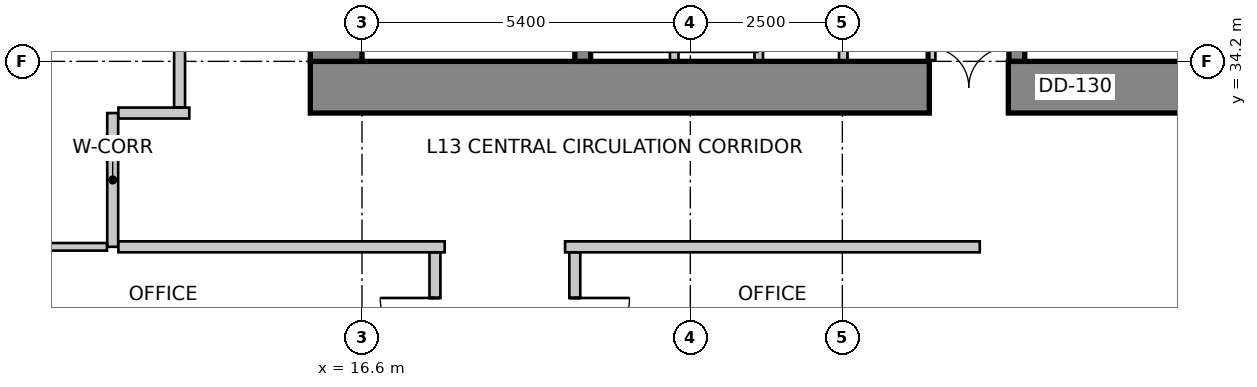
"""IFC4 building model, lengths in metres.
Left out: names, types, materials, properties, quantities, classifications, styles, units other than length and angle.
Written with IfcOpenShell. Run it as: python <this file> out.ifc"""

import sys

from ifc_helpers import new_model, si_unit, direction, frame, frame_2d, origin, place, context, subcontext, project, spatial, rectangle, extrude, source, transform, mapped, element, fill, save


model = new_model("IFC4")
c1 = context("Model", 3, precision=1e-05, world=origin(), true_north=direction((0.0, 1.0)))
c2 = subcontext(c1, "Body", "Model", "MODEL_VIEW")
j1 = project(units=[si_unit("LENGTHUNIT", "METRE"), si_unit("PLANEANGLEUNIT", "RADIAN")], contexts=[c1])
p1 = place(None, origin())
s1 = spatial("IfcSite", under=j1, at=p1, CompositionType="ELEMENT")
p2 = place(p1, origin())
s2 = spatial("IfcBuilding", under=s1, at=p2, CompositionType="ELEMENT")
p3 = place(p2, frame((0.0, 0.0, 55.0)))
s3 = spatial("IfcBuildingStorey", under=s2, at=p3, CompositionType="ELEMENT", Elevation=55.0)
p4 = place(p3, frame((15.75, 33.775, 0.0), z_axis=(0.0, 0.0, 1.0), x_axis=(1.0, 0.0, 0.0)))
e1 = element("IfcWall", 1, at=p4, inside=s3, PredefinedType="SHEAR", context=c2, shape_type="SweptSolid", body=[
    extrude(rectangle(XDim=16.1, YDim=0.85, at=frame_2d((8.05, 0.0))), origin(), (0.0, 0.0, 1.0), 4.0),
])
m1 = source(origin(), c2, "Body", "SweptSolid", [
    extrude(rectangle(XDim=1.3, YDim=2.15, at=frame_2d((0.65, 1.075))), frame((0.0, 0.435, 0.0), z_axis=(0.0, -1.0, 0.0), x_axis=(1.0, 0.0, 0.0)), (0.0, 0.0, 1.0), 0.87),
])
p5 = place(p4, frame((10.18, 0.0, 0.0)))
e2 = element("IfcOpeningElement", 2, at=p5, cuts=e1, PredefinedType="OPENING", context=c2, shape_type="MappedRepresentation", body=[
    mapped(m1, transform((0.0, 0.0, 0.0), scale=1.0)),
])
p6 = place(p3, frame((16.175, 34.2, 0.0), z_axis=(0.0, 0.0, 1.0), x_axis=(0.0, 1.0, 0.0)))
e3 = element("IfcWall", 3, at=p6, inside=s3, PredefinedType="SHEAR", context=c2, shape_type="SweptSolid", body=[
    extrude(rectangle(XDim=11.4, YDim=0.85, at=frame_2d((5.7, 0.0))), origin(), (0.0, 0.0, 1.0), 4.0),
])
m2 = source(origin(), c2, "Body", "SweptSolid", [
    extrude(rectangle(XDim=1.1, YDim=2.15, at=frame_2d((0.55, 1.075))), frame((0.0, 0.435, 0.0), z_axis=(0.0, -1.0, 0.0), x_axis=(1.0, 0.0, 0.0)), (0.0, 0.0, 1.0), 0.87),
])
p7 = place(p6, frame((7.15, 0.0, 0.0)))
e4 = element("IfcOpeningElement", 4, at=p7, cuts=e3, PredefinedType="OPENING", context=c2, shape_type="MappedRepresentation", body=[
    mapped(m2, transform((0.0, 0.0, 0.0), scale=1.0)),
])
p8 = place(p3, frame((20.23, 34.2, 0.0), z_axis=(0.0, 0.0, 1.0), x_axis=(0.0, 1.0, 0.0)))
e5 = element("IfcWall", 5, at=p8, inside=s3, PredefinedType="SHEAR", context=c2, shape_type="SweptSolid", body=[
    extrude(rectangle(XDim=9.06, YDim=0.26, at=frame_2d((4.53, 0.0))), origin(), (0.0, 0.0, 1.0), 4.0),
])
m3 = source(origin(), c2, "Body", "SweptSolid", [
    extrude(rectangle(XDim=1.1, YDim=2.15, at=frame_2d((0.55, 1.075))), frame((0.0, 0.14, 0.0), z_axis=(0.0, -1.0, 0.0), x_axis=(1.0, 0.0, 0.0)), (0.0, 0.0, 1.0), 0.28),
])
p9 = place(p8, frame((7.45, 0.0, 0.0)))
e6 = element("IfcOpeningElement", 6, at=p9, cuts=e5, PredefinedType="OPENING", context=c2, shape_type="MappedRepresentation", body=[
    mapped(m3, transform((0.0, 0.0, 0.0), scale=1.0)),
])
p10 = place(p3, frame((27.37, 34.2, 0.0), z_axis=(0.0, 0.0, 1.0), x_axis=(0.0, 1.0, 0.0)))
e7 = element("IfcWall", 7, at=p10, inside=s3, PredefinedType="SHEAR", context=c2, shape_type="SweptSolid", body=[
    extrude(rectangle(XDim=9.06, YDim=0.26, at=frame_2d((4.53, 0.0))), origin(), (0.0, 0.0, 1.0), 4.0),
])
p11 = place(p10, frame((7.45, 0.0, 0.0)))
e8 = element("IfcOpeningElement", 8, at=p11, cuts=e7, PredefinedType="OPENING", context=c2, shape_type="MappedRepresentation", body=[
    mapped(m3, transform((0.0, 0.0, 0.0), scale=1.0)),
])
p12 = place(p3, frame((13.269, 47.134, 0.0), z_axis=(0.0, 0.0, 1.0), x_axis=(-0.319920423265, -0.947444416722, 0.0)))
e9 = element("IfcWall", 9, at=p12, inside=s3, PredefinedType="SOLIDWALL", context=c2, shape_type="SweptSolid", body=[
    extrude(rectangle(XDim=16.135, YDim=0.3, at=frame_2d((8.067, 0.0))), origin(), (0.0, 0.0, 1.0), 3.75),
])
m4 = source(origin(), c2, "Body", "SweptSolid", [
    extrude(rectangle(XDim=2.4, YDim=2.2, at=frame_2d((1.2, 1.1))), frame((0.0, 0.16, 0.0), z_axis=(0.0, -1.0, 0.0), x_axis=(1.0, 0.0, 0.0)), (0.0, 0.0, 1.0), 0.32),
])
p13 = place(p12, frame((2.188, 0.0, 0.85)))
e10 = element("IfcOpeningElement", 10, at=p13, cuts=e9, PredefinedType="OPENING", context=c2, shape_type="MappedRepresentation", body=[
    mapped(m4, transform((0.0, 0.0, 0.0), scale=1.0)),
])
m5 = source(origin(), c2, "Body", "SweptSolid", [
    extrude(rectangle(XDim=2.8, YDim=2.4, at=frame_2d((1.4, 1.2))), frame((0.0, 0.16, 0.0), z_axis=(0.0, -1.0, 0.0), x_axis=(1.0, 0.0, 0.0)), (0.0, 0.0, 1.0), 0.32),
])
p14 = place(p12, frame((6.959, 0.0, 0.85)))
e11 = element("IfcOpeningElement", 11, at=p14, cuts=e9, PredefinedType="OPENING", context=c2, shape_type="MappedRepresentation", body=[
    mapped(m5, transform((0.0, 0.0, 0.0), scale=1.0)),
])
p15 = place(p12, frame((12.13, 0.0, 0.85)))
e12 = element("IfcOpeningElement", 12, at=p15, cuts=e9, PredefinedType="OPENING", context=c2, shape_type="MappedRepresentation", body=[
    mapped(m4, transform((0.0, 0.0, 0.0), scale=1.0)),
])
p16 = place(p3, frame((8.183, 31.833, 0.0), z_axis=(0.0, 0.0, 1.0), x_axis=(0.18216364648, -0.983268226834, 0.0)))
e13 = element("IfcWall", 13, at=p16, inside=s3, PredefinedType="SOLIDWALL", context=c2, shape_type="SweptSolid", body=[
    extrude(rectangle(XDim=26.678, YDim=0.3, at=frame_2d((13.339, 0.0))), origin(), (0.0, 0.0, 1.0), 3.75),
])
m6 = source(origin(), c2, "Body", "SweptSolid", [
    extrude(rectangle(XDim=2.1, YDim=2.0, at=frame_2d((1.05, 1.0))), frame((0.0, 0.16, 0.0), z_axis=(0.0, -1.0, 0.0), x_axis=(1.0, 0.0, 0.0)), (0.0, 0.0, 1.0), 0.32),
])
p17 = place(p16, frame((1.014, 0.0, 0.85)))
e14 = element("IfcOpeningElement", 14, at=p17, cuts=e13, PredefinedType="OPENING", context=c2, shape_type="MappedRepresentation", body=[
    mapped(m6, transform((0.0, 0.0, 0.0), scale=1.0)),
])
p18 = place(p16, frame((4.3, 0.0, 0.85)))
e15 = element("IfcOpeningElement", 15, at=p18, cuts=e13, PredefinedType="OPENING", context=c2, shape_type="MappedRepresentation", body=[
    mapped(m5, transform((0.0, 0.0, 0.0), scale=1.0)),
])
p19 = place(p16, frame((8.876, 0.0, 0.85)))
e16 = element("IfcOpeningElement", 16, at=p19, cuts=e13, PredefinedType="OPENING", context=c2, shape_type="MappedRepresentation", body=[
    mapped(m5, transform((0.0, 0.0, 0.0), scale=1.0)),
])
p20 = place(p16, frame((13.453, 0.0, 0.85)))
e17 = element("IfcOpeningElement", 17, at=p20, cuts=e13, PredefinedType="OPENING", context=c2, shape_type="MappedRepresentation", body=[
    mapped(m5, transform((0.0, 0.0, 0.0), scale=1.0)),
])
p21 = place(p16, frame((18.211, 0.0, 0.85)))
e18 = element("IfcOpeningElement", 18, at=p21, cuts=e13, PredefinedType="OPENING", context=c2, shape_type="MappedRepresentation", body=[
    mapped(m5, transform((0.0, 0.0, 0.0), scale=1.0)),
])
p22 = place(p16, frame((22.909, 0.0, 0.85)))
e19 = element("IfcOpeningElement", 19, at=p22, cuts=e13, PredefinedType="OPENING", context=c2, shape_type="MappedRepresentation", body=[
    mapped(m4, transform((0.0, 0.0, 0.0), scale=1.0)),
])
for number, where, z_axis, x_axis in (
    (20, (25.96, 34.22, 0.0), (0.0, 0.0, 1.0), (0.0, 1.0, 0.0)),
    (21, (21.735, 34.22, 0.0), (0.0, 0.0, 1.0), (0.0, 1.0, 0.0)),
    (22, (23.125, 34.22, 0.0), (0.0, 0.0, 1.0), (0.0, 1.0, 0.0)),
    (23, (24.515, 34.22, 0.0), (0.0, 0.0, 1.0), (0.0, 1.0, 0.0)),
):
    element("IfcWall", number, at=place(p3, frame(where, z_axis=z_axis, x_axis=x_axis)), inside=s3, PredefinedType="SOLIDWALL", context=c2, shape_type="SweptSolid", body=[
        extrude(rectangle(XDim=1.62, YDim=0.14, at=frame_2d((0.81, 0.0))), origin(), (0.0, 0.0, 1.0), 3.042),
    ])
p23 = place(p3, frame((12.5, 31.15, 0.0), z_axis=(0.0, 0.0, 1.0), x_axis=(0.0, 1.0, 0.0)))
e24 = element("IfcWall", 24, at=p23, inside=s3, PredefinedType="PARTITIONING", context=c2, shape_type="SweptSolid", body=[
    extrude(rectangle(XDim=2.2, YDim=0.18, at=frame_2d((1.1, 0.0))), origin(), (0.0, 0.0, 1.0), 3.419),
])
p24 = place(p3, frame((12.594, 33.35, 0.0), z_axis=(0.0, 0.0, 1.0), x_axis=(1.0, 0.0, 0.0)))
e25 = element("IfcWall", 25, at=p24, inside=s3, PredefinedType="PARTITIONING", context=c2, shape_type="SweptSolid", body=[
    extrude(rectangle(XDim=1.166, YDim=0.18, at=frame_2d((0.583, 0.0))), origin(), (0.0, 0.0, 1.0), 3.75),
])
p25 = place(p3, frame((17.96, 31.15, 0.0), z_axis=(0.0, 0.0, 1.0), x_axis=(-1.0, 0.0, 0.0)))
e26 = element("IfcWall", 26, at=p25, inside=s3, PredefinedType="PARTITIONING", context=c2, shape_type="SweptSolid", body=[
    extrude(rectangle(XDim=5.366, YDim=0.18, at=frame_2d((2.683, 0.0))), origin(), (0.0, 0.0, 1.0), 3.419),
])
p26 = place(p3, frame((26.76, 31.15, 0.0), z_axis=(0.0, 0.0, 1.0), x_axis=(-1.0, 0.0, 0.0)))
e27 = element("IfcWall", 27, at=p26, inside=s3, PredefinedType="PARTITIONING", context=c2, shape_type="SweptSolid", body=[
    extrude(rectangle(XDim=6.82, YDim=0.18, at=frame_2d((3.41, 0.0))), origin(), (0.0, 0.0, 1.0), 3.419),
])
p27 = place(p3, frame((13.6, 33.444, 0.0), z_axis=(0.0, 0.0, 1.0), x_axis=(0.0, 1.0, 0.0)))
e28 = element("IfcWall", 28, at=p27, inside=s3, PredefinedType="PARTITIONING", context=c2, shape_type="SweptSolid", body=[
    extrude(rectangle(XDim=13.896, YDim=0.18, at=frame_2d((6.948, 0.0))), origin(), (0.0, 0.0, 1.0), 2.892),
])
m7 = source(origin(), c2, "Body", "SweptSolid", [
    extrude(rectangle(XDim=0.9, YDim=2.15, at=frame_2d((0.45, 1.075))), frame((0.0, 0.1, 0.0), z_axis=(0.0, -1.0, 0.0), x_axis=(1.0, 0.0, 0.0)), (0.0, 0.0, 1.0), 0.2),
])
p28 = place(p27, frame((4.144, 0.0, 0.0)))
e29 = element("IfcOpeningElement", 29, at=p28, cuts=e28, PredefinedType="OPENING", context=c2, shape_type="MappedRepresentation", body=[
    mapped(m7, transform((0.0, 0.0, 0.0), scale=1.0)),
])
p29 = place(p3, frame((12.406, 31.15, 0.0), z_axis=(0.0, 0.0, 1.0), x_axis=(-1.0, 0.0, 0.0)))
e30 = element("IfcWall", 30, at=p29, inside=s3, PredefinedType="PARTITIONING", context=c2, shape_type="SweptSolid", body=[
    extrude(rectangle(XDim=3.979, YDim=0.125, at=frame_2d((1.99, 0.0))), origin(), (0.0, 0.0, 1.0), 2.892),
])
p30 = place(p3, frame((17.8, 28.662, 0.0), z_axis=(0.0, 0.0, 1.0), x_axis=(0.0, 1.0, 0.0)))
e31 = element("IfcWall", 31, at=p30, inside=s3, PredefinedType="PARTITIONING", context=c2, shape_type="SweptSolid", body=[
    extrude(rectangle(XDim=2.394, YDim=0.18, at=frame_2d((1.197, 0.0))), origin(), (0.0, 0.0, 1.0), 3.419),
])
p31 = place(p30, frame((0.747, 0.0, 0.0)))
e32 = element("IfcOpeningElement", 32, at=p31, cuts=e31, PredefinedType="OPENING", context=c2, shape_type="MappedRepresentation", body=[
    mapped(m7, transform((0.0, 0.0, 0.0), scale=1.0)),
])
p32 = place(p3, frame((20.1, 31.056, 0.0), z_axis=(0.0, 0.0, 1.0), x_axis=(0.0, -1.0, 0.0)))
e33 = element("IfcWall", 33, at=p32, inside=s3, PredefinedType="PARTITIONING", context=c2, shape_type="SweptSolid", body=[
    extrude(rectangle(XDim=2.394, YDim=0.18, at=frame_2d((1.197, 0.0))), origin(), (0.0, 0.0, 1.0), 3.419),
])
p33 = place(p32, frame((0.747, 0.0, 0.0)))
e34 = element("IfcOpeningElement", 34, at=p33, cuts=e33, PredefinedType="OPENING", context=c2, shape_type="MappedRepresentation", body=[
    mapped(m7, transform((0.0, 0.0, 0.0), scale=1.0)),
])
m8 = source(origin(), c2, "Body", "SweptSolid", [
    extrude(rectangle(XDim=1.3, YDim=2.15, at=frame_2d((0.65, 1.075))), frame((0.0, 0.025, 0.0), z_axis=(0.0, -1.0, 0.0), x_axis=(1.0, 0.0, 0.0)), (0.0, 0.0, 1.0), 0.05),
])
p34 = place(p5, origin())
e35 = element("IfcDoor", 35, at=p34, inside=s3, OperationType="DOUBLE_DOOR_SINGLE_SWING", PredefinedType="DOOR", context=c2, shape_type="MappedRepresentation", body=[
    mapped(m8, transform((0.0, 0.0, 0.0), scale=1.0)),
])
fill(e2, e35)
m9 = source(origin(), c2, "Body", "SweptSolid", [
    extrude(rectangle(XDim=0.9, YDim=2.15, at=frame_2d((0.45, 1.075))), frame((0.0, 0.025, 0.0), z_axis=(0.0, -1.0, 0.0), x_axis=(1.0, 0.0, 0.0)), (0.0, 0.0, 1.0), 0.05),
])
p35 = place(p31, origin())
e36 = element("IfcDoor", 36, at=p35, inside=s3, OperationType="SINGLE_SWING_RIGHT", PredefinedType="DOOR", context=c2, shape_type="MappedRepresentation", body=[
    mapped(m9, transform((0.0, 0.0, 0.0), scale=1.0)),
])
fill(e32, e36)
p36 = place(p33, origin())
e37 = element("IfcDoor", 37, at=p36, inside=s3, OperationType="SINGLE_SWING_LEFT", PredefinedType="DOOR", context=c2, shape_type="MappedRepresentation", body=[
    mapped(m9, transform((0.0, 0.0, 0.0), scale=1.0)),
])
fill(e34, e37)
save(model, sys.argv[1])
